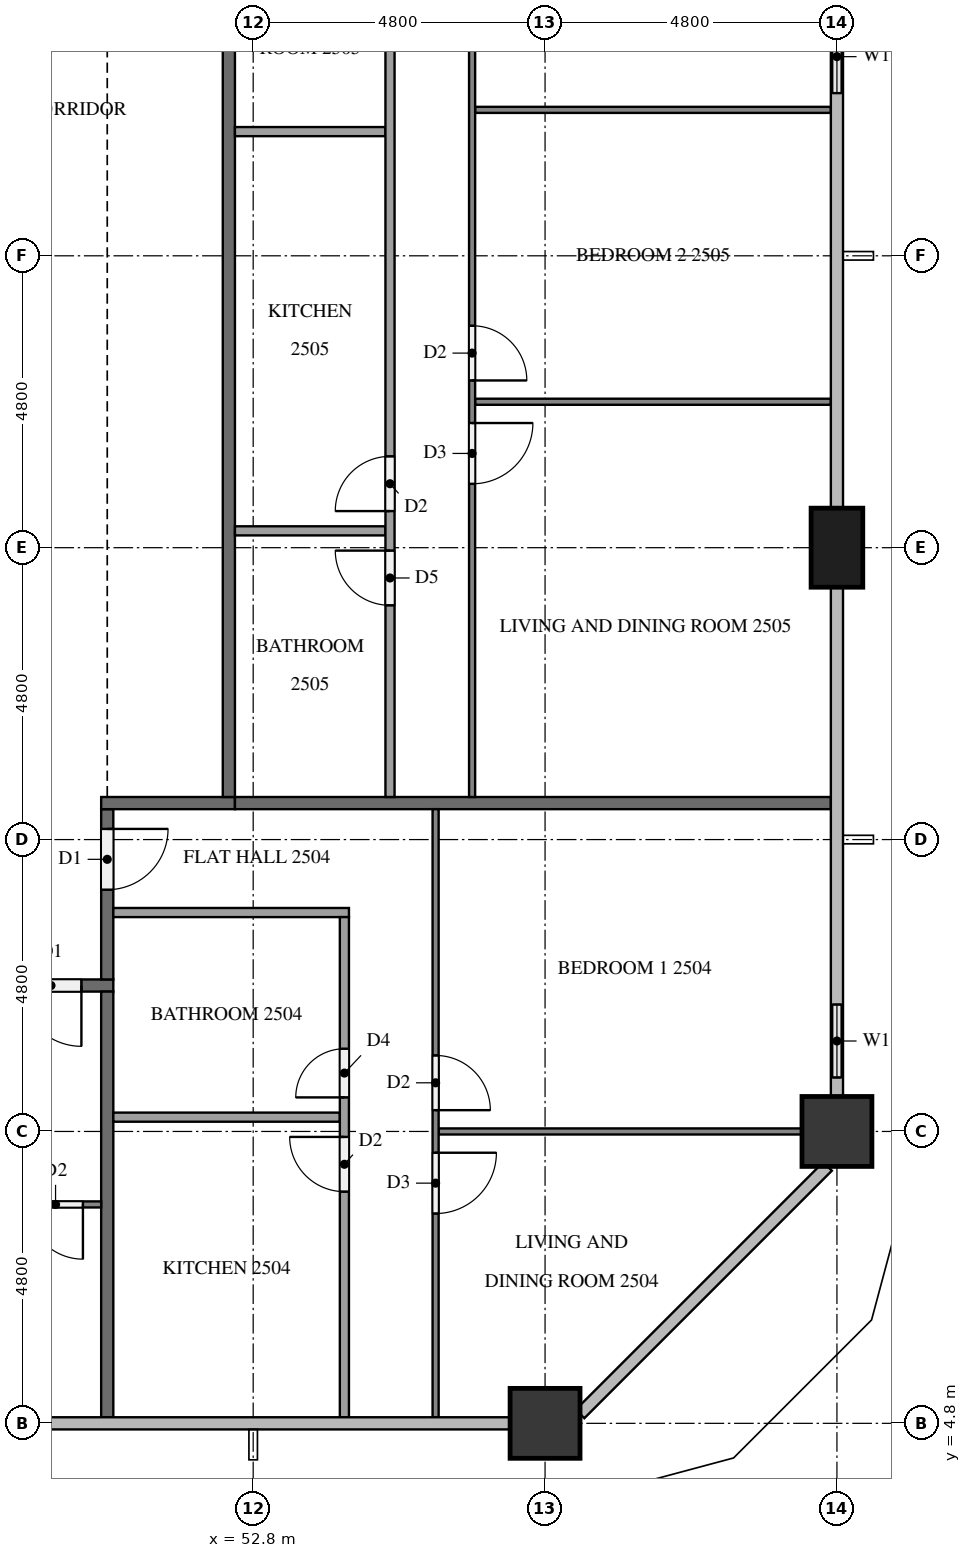
"""IFC4 building model, lengths in metres.
Left out: names, types, materials, properties, quantities, classifications, styles, units other than length and angle.
Written with IfcOpenShell. Run it as: python <this file> out.ifc"""

import sys

from ifc_helpers import new_model, si_unit, direction, frame, frame_2d, origin, origin_2d, place, context, subcontext, project, spatial, rectangle, extrude, element, fill, save


model = new_model("IFC4")
c1 = context("Model", 3, precision=1e-05, world=origin(), true_north=direction((0.0, 1.0)))
c2 = subcontext(c1, "Body", "Model", "MODEL_VIEW")
j1 = project(units=[si_unit("LENGTHUNIT", "METRE"), si_unit("PLANEANGLEUNIT", "RADIAN")], contexts=[c1])
p1 = place(None, origin())
s1 = spatial("IfcSite", under=j1, at=p1, CompositionType="ELEMENT")
p2 = place(p1, origin())
s2 = spatial("IfcBuilding", under=s1, at=p2, CompositionType="ELEMENT")
p3 = place(p2, frame((0.0, 0.0, 99.7)))
s3 = spatial("IfcBuildingStorey", under=s2, at=p3, CompositionType="ELEMENT", Elevation=99.7)
for number, where, z_axis, x_axis in (
    (1, (57.6, 4.8, 0.0), (0.0, 0.0, 1.0), (1.0, 0.0, 0.0)),
    (2, (62.4, 9.6, 0.0), (0.0, 0.0, 1.0), (1.0, 0.0, 0.0)),
):
    element("IfcColumn", number, at=place(p3, frame(where, z_axis=z_axis, x_axis=x_axis)), inside=s3, PredefinedType="COLUMN", context=c2, shape_type="SweptSolid", body=[
        extrude(rectangle(XDim=1.15, YDim=1.15, at=origin_2d()), origin(), (0.0, 0.0, 1.0), 3.2),
    ])
p4 = place(p3, frame((62.4, 19.2, 0.0), z_axis=(0.0, 0.0, 1.0), x_axis=(0.0, 1.0, 0.0)))
e3 = element("IfcColumn", 3, at=p4, inside=s3, PredefinedType="COLUMN", context=c2, shape_type="SweptSolid", body=[
    extrude(rectangle(XDim=1.3, YDim=0.85, at=origin_2d()), origin(), (0.0, 0.0, 1.0), 3.2),
])
p5 = place(p3, frame((62.4, 10.175, 0.0), z_axis=(0.0, 0.0, 1.0), x_axis=(0.0, 1.0, 0.0)))
e4 = element("IfcWall", 4, at=p5, inside=s3, PredefinedType="SOLIDWALL", context=c2, shape_type="SweptSolid", body=[
    extrude(rectangle(XDim=1.825, YDim=0.15, at=frame_2d((0.913, 0.0))), origin(), (0.0, 0.0, 1.0), 3.2),
])
p6 = place(p5, frame((0.312, 0.0, 0.9)))
e5 = element("IfcOpeningElement", 5, at=p6, cuts=e4, PredefinedType="OPENING", context=c2, shape_type="SweptSolid", body=[
    extrude(rectangle(XDim=1.2, YDim=1.4, at=frame_2d((0.6, 0.7))), frame((0.0, 0.085, 0.0), z_axis=(0.0, -1.0, 0.0), x_axis=(1.0, 0.0, 0.0)), (0.0, 0.0, 1.0), 0.17),
])
p7 = place(p3, frame((62.4, 26.4, 0.0), z_axis=(0.0, 0.0, 1.0), x_axis=(0.0, 1.0, 0.0)))
e6 = element("IfcWall", 6, at=p7, inside=s3, PredefinedType="SOLIDWALL", context=c2, shape_type="SweptSolid", body=[
    extrude(rectangle(XDim=1.75, YDim=0.15, at=frame_2d((0.875, 0.0))), origin(), (0.0, 0.0, 1.0), 3.2),
])
p8 = place(p7, frame((0.275, 0.0, 0.9)))
e7 = element("IfcOpeningElement", 7, at=p8, cuts=e6, PredefinedType="OPENING", context=c2, shape_type="SweptSolid", body=[
    extrude(rectangle(XDim=1.2, YDim=1.4, at=frame_2d((0.6, 0.7))), frame((0.0, 0.085, 0.0), z_axis=(0.0, -1.0, 0.0), x_axis=(1.0, 0.0, 0.0)), (0.0, 0.0, 1.0), 0.17),
])
p9 = place(p3, frame((50.5, 12.0, 0.0), z_axis=(0.0, 0.0, 1.0), x_axis=(-1.0, 0.0, 0.0)))
e8 = element("IfcWall", 8, at=p9, inside=s3, PredefinedType="PARTITIONING", context=c2, shape_type="SweptSolid", body=[
    extrude(rectangle(XDim=38.6, YDim=0.2, at=frame_2d((19.3, 0.0))), origin(), (0.0, 0.0, 1.0), 3.2),
])
p10 = place(p9, frame((37.075, 0.0, 0.0)))
e9 = element("IfcOpeningElement", 9, at=p10, cuts=e8, PredefinedType="OPENING", context=c2, shape_type="SweptSolid", body=[
    extrude(rectangle(XDim=1.0, YDim=2.1, at=frame_2d((0.5, 1.05))), frame((0.0, 0.11, 0.0), z_axis=(0.0, -1.0, 0.0), x_axis=(1.0, 0.0, 0.0)), (0.0, 0.0, 1.0), 0.22),
])
p11 = place(p9, frame((22.675, 0.0, 0.0)))
e10 = element("IfcOpeningElement", 10, at=p11, cuts=e8, PredefinedType="OPENING", context=c2, shape_type="SweptSolid", body=[
    extrude(rectangle(XDim=1.0, YDim=2.1, at=frame_2d((0.5, 1.05))), frame((0.0, 0.11, 0.0), z_axis=(0.0, -1.0, 0.0), x_axis=(1.0, 0.0, 0.0)), (0.0, 0.0, 1.0), 0.22),
])
p12 = place(p9, frame((0.525, 0.0, 0.0)))
e11 = element("IfcOpeningElement", 11, at=p12, cuts=e8, PredefinedType="OPENING", context=c2, shape_type="SweptSolid", body=[
    extrude(rectangle(XDim=1.0, YDim=2.1, at=frame_2d((0.5, 1.05))), frame((0.0, 0.11, 0.0), z_axis=(0.0, -1.0, 0.0), x_axis=(1.0, 0.0, 0.0)), (0.0, 0.0, 1.0), 0.22),
])
p13 = place(p3, frame((50.4, 14.9, 0.0), z_axis=(0.0, 0.0, 1.0), x_axis=(0.0, -1.0, 0.0)))
e12 = element("IfcWall", 12, at=p13, inside=s3, PredefinedType="PARTITIONING", context=c2, shape_type="SweptSolid", body=[
    extrude(rectangle(XDim=2.8, YDim=0.2, at=frame_2d((1.4, 0.0))), origin(), (0.0, 0.0, 1.0), 3.2),
])
p14 = place(p13, frame((0.325, 0.0, 0.0)))
e13 = element("IfcOpeningElement", 13, at=p14, cuts=e12, PredefinedType="OPENING", context=c2, shape_type="SweptSolid", body=[
    extrude(rectangle(XDim=1.0, YDim=2.1, at=frame_2d((0.5, 1.05))), frame((0.0, 0.11, 0.0), z_axis=(0.0, -1.0, 0.0), x_axis=(1.0, 0.0, 0.0)), (0.0, 0.0, 1.0), 0.22),
])
p15 = place(p3, frame((50.3, 15.0, 0.0), z_axis=(0.0, 0.0, 1.0), x_axis=(1.0, 0.0, 0.0)))
e14 = element("IfcWall", 14, at=p15, inside=s3, PredefinedType="PARTITIONING", context=c2, shape_type="SweptSolid", body=[
    extrude(rectangle(XDim=2.2, YDim=0.2, at=frame_2d((1.1, 0.0))), origin(), (0.0, 0.0, 1.0), 3.2),
])
p16 = place(p3, frame((52.4, 37.7, 0.0), z_axis=(0.0, 0.0, 1.0), x_axis=(0.0, -1.0, 0.0)))
e15 = element("IfcWall", 15, at=p16, inside=s3, PredefinedType="PARTITIONING", context=c2, shape_type="SweptSolid", body=[
    extrude(rectangle(XDim=22.6, YDim=0.2, at=frame_2d((11.3, 0.0))), origin(), (0.0, 0.0, 1.0), 3.2),
])
p17 = place(p16, frame((6.925, 0.0, 0.0)))
e16 = element("IfcOpeningElement", 16, at=p17, cuts=e15, PredefinedType="OPENING", context=c2, shape_type="SweptSolid", body=[
    extrude(rectangle(XDim=1.0, YDim=2.1, at=frame_2d((0.5, 1.05))), frame((0.0, 0.11, 0.0), z_axis=(0.0, -1.0, 0.0), x_axis=(1.0, 0.0, 0.0)), (0.0, 0.0, 1.0), 0.22),
])
p18 = place(p16, frame((5.075, 0.0, 0.0)))
e17 = element("IfcOpeningElement", 17, at=p18, cuts=e15, PredefinedType="OPENING", context=c2, shape_type="SweptSolid", body=[
    extrude(rectangle(XDim=1.0, YDim=2.1, at=frame_2d((0.5, 1.05))), frame((0.0, 0.11, 0.0), z_axis=(0.0, -1.0, 0.0), x_axis=(1.0, 0.0, 0.0)), (0.0, 0.0, 1.0), 0.22),
])
p19 = place(p3, frame((50.4, 11.9, 0.0), z_axis=(0.0, 0.0, 1.0), x_axis=(0.0, -1.0, 0.0)))
e18 = element("IfcWall", 18, at=p19, inside=s3, PredefinedType="PARTITIONING", context=c2, shape_type="SweptSolid", body=[
    extrude(rectangle(XDim=7.0, YDim=0.2, at=frame_2d((3.5, 0.0))), origin(), (0.0, 0.0, 1.0), 3.2),
])
p20 = place(p3, frame((52.5, 15.0, 0.0), z_axis=(0.0, 0.0, 1.0), x_axis=(1.0, 0.0, 0.0)))
e19 = element("IfcWall", 19, at=p20, inside=s3, PredefinedType="PARTITIONING", context=c2, shape_type="SweptSolid", body=[
    extrude(rectangle(XDim=9.8, YDim=0.2, at=frame_2d((4.9, 0.0))), origin(), (0.0, 0.0, 1.0), 3.2),
])
p21 = place(p3, frame((50.3, 8.4, 0.0), z_axis=(0.0, 0.0, 1.0), x_axis=(-1.0, 0.0, 0.0)))
e20 = element("IfcWall", 20, at=p21, inside=s3, PredefinedType="PARTITIONING", context=c2, shape_type="SweptSolid", body=[
    extrude(rectangle(XDim=9.4, YDim=0.1, at=frame_2d((4.7, 0.0))), origin(), (0.0, 0.0, 1.0), 3.2),
])
p22 = place(p21, frame((0.3, 0.0, 0.0)))
e21 = element("IfcOpeningElement", 21, at=p22, cuts=e20, PredefinedType="OPENING", context=c2, shape_type="SweptSolid", body=[
    extrude(rectangle(XDim=0.9, YDim=2.1, at=frame_2d((0.45, 1.05))), frame((0.0, 0.06, 0.0), z_axis=(0.0, -1.0, 0.0), x_axis=(1.0, 0.0, 0.0)), (0.0, 0.0, 1.0), 0.12),
])
p23 = place(p21, frame((8.1, 0.0, 0.0)))
e22 = element("IfcOpeningElement", 22, at=p23, cuts=e20, PredefinedType="OPENING", context=c2, shape_type="SweptSolid", body=[
    extrude(rectangle(XDim=1.0, YDim=2.1, at=frame_2d((0.5, 1.05))), frame((0.0, 0.06, 0.0), z_axis=(0.0, -1.0, 0.0), x_axis=(1.0, 0.0, 0.0)), (0.0, 0.0, 1.0), 0.12),
])
p24 = place(p3, frame((55.85, 9.6, 0.0), z_axis=(0.0, 0.0, 1.0), x_axis=(1.0, 0.0, 0.0)))
e23 = element("IfcWall", 23, at=p24, inside=s3, PredefinedType="PARTITIONING", context=c2, shape_type="SweptSolid", body=[
    extrude(rectangle(XDim=5.975, YDim=0.1, at=frame_2d((2.987, 0.0))), origin(), (0.0, 0.0, 1.0), 3.2),
])
p25 = place(p3, frame((55.8, 14.9, 0.0), z_axis=(0.0, 0.0, 1.0), x_axis=(0.0, -1.0, 0.0)))
e24 = element("IfcWall", 24, at=p25, inside=s3, PredefinedType="PARTITIONING", context=c2, shape_type="SweptSolid", body=[
    extrude(rectangle(XDim=10.0, YDim=0.1, at=frame_2d((5.0, 0.0))), origin(), (0.0, 0.0, 1.0), 3.2),
])
p26 = place(p25, frame((4.05, 0.0, 0.0)))
e25 = element("IfcOpeningElement", 25, at=p26, cuts=e24, PredefinedType="OPENING", context=c2, shape_type="SweptSolid", body=[
    extrude(rectangle(XDim=0.9, YDim=2.1, at=frame_2d((0.45, 1.05))), frame((0.0, 0.06, 0.0), z_axis=(0.0, -1.0, 0.0), x_axis=(1.0, 0.0, 0.0)), (0.0, 0.0, 1.0), 0.12),
])
p27 = place(p25, frame((5.65, 0.0, 0.0)))
e26 = element("IfcOpeningElement", 26, at=p27, cuts=e24, PredefinedType="OPENING", context=c2, shape_type="SweptSolid", body=[
    extrude(rectangle(XDim=1.0, YDim=2.1, at=frame_2d((0.5, 1.05))), frame((0.0, 0.06, 0.0), z_axis=(0.0, -1.0, 0.0), x_axis=(1.0, 0.0, 0.0)), (0.0, 0.0, 1.0), 0.12),
])
p28 = place(p3, frame((50.5, 9.835, 0.0), z_axis=(0.0, 0.0, 1.0), x_axis=(1.0, 0.0, 0.0)))
e27 = element("IfcWall", 27, at=p28, inside=s3, PredefinedType="PARTITIONING", context=c2, shape_type="SweptSolid", body=[
    extrude(rectangle(XDim=3.725, YDim=0.15, at=frame_2d((1.863, 0.0))), origin(), (0.0, 0.0, 1.0), 3.2),
])
p29 = place(p3, frame((50.5, 13.2, 0.0), z_axis=(0.0, 0.0, 1.0), x_axis=(1.0, 0.0, 0.0)))
e28 = element("IfcWall", 28, at=p29, inside=s3, PredefinedType="PARTITIONING", context=c2, shape_type="SweptSolid", body=[
    extrude(rectangle(XDim=3.875, YDim=0.15, at=frame_2d((1.938, 0.0))), origin(), (0.0, 0.0, 1.0), 3.2),
])
p30 = place(p3, frame((54.3, 4.9, 0.0), z_axis=(0.0, 0.0, 1.0), x_axis=(0.0, 1.0, 0.0)))
e29 = element("IfcWall", 29, at=p30, inside=s3, PredefinedType="PARTITIONING", context=c2, shape_type="SweptSolid", body=[
    extrude(rectangle(XDim=8.225, YDim=0.15, at=frame_2d((4.113, 0.0))), origin(), (0.0, 0.0, 1.0), 3.2),
])
p31 = place(p30, frame((5.26, 0.0, 0.0)))
e30 = element("IfcOpeningElement", 30, at=p31, cuts=e29, PredefinedType="OPENING", context=c2, shape_type="SweptSolid", body=[
    extrude(rectangle(XDim=0.8, YDim=2.1, at=frame_2d((0.4, 1.05))), frame((0.0, 0.085, 0.0), z_axis=(0.0, -1.0, 0.0), x_axis=(1.0, 0.0, 0.0)), (0.0, 0.0, 1.0), 0.17),
])
p32 = place(p30, frame((3.71, 0.0, 0.0)))
e31 = element("IfcOpeningElement", 31, at=p32, cuts=e29, PredefinedType="OPENING", context=c2, shape_type="SweptSolid", body=[
    extrude(rectangle(XDim=0.9, YDim=2.1, at=frame_2d((0.45, 1.05))), frame((0.0, 0.085, 0.0), z_axis=(0.0, -1.0, 0.0), x_axis=(1.0, 0.0, 0.0)), (0.0, 0.0, 1.0), 0.17),
])
for number, where, z_axis, x_axis in (
    (32, (56.45, 26.4, 0.0), (0.0, 0.0, 1.0), (1.0, 0.0, 0.0)),
    (33, (56.45, 21.6, 0.0), (0.0, 0.0, 1.0), (1.0, 0.0, 0.0)),
):
    element("IfcWall", number, at=place(p3, frame(where, z_axis=z_axis, x_axis=x_axis)), inside=s3, PredefinedType="PARTITIONING", context=c2, shape_type="SweptSolid", body=[
        extrude(rectangle(XDim=5.85, YDim=0.1, at=frame_2d((2.925, 0.0))), origin(), (0.0, 0.0, 1.0), 3.2),
    ])
p33 = place(p3, frame((56.4, 31.1, 0.0), z_axis=(0.0, 0.0, 1.0), x_axis=(0.0, -1.0, 0.0)))
e34 = element("IfcWall", 34, at=p33, inside=s3, PredefinedType="PARTITIONING", context=c2, shape_type="SweptSolid", body=[
    extrude(rectangle(XDim=16.0, YDim=0.1, at=frame_2d((8.0, 0.0))), origin(), (0.0, 0.0, 1.0), 3.2),
])
p34 = place(p33, frame((0.3, 0.0, 0.0)))
e35 = element("IfcOpeningElement", 35, at=p34, cuts=e34, PredefinedType="OPENING", context=c2, shape_type="SweptSolid", body=[
    extrude(rectangle(XDim=0.9, YDim=2.1, at=frame_2d((0.45, 1.05))), frame((0.0, 0.06, 0.0), z_axis=(0.0, -1.0, 0.0), x_axis=(1.0, 0.0, 0.0)), (0.0, 0.0, 1.0), 0.12),
])
p35 = place(p33, frame((8.25, 0.0, 0.0)))
e36 = element("IfcOpeningElement", 36, at=p35, cuts=e34, PredefinedType="OPENING", context=c2, shape_type="SweptSolid", body=[
    extrude(rectangle(XDim=0.9, YDim=2.1, at=frame_2d((0.45, 1.05))), frame((0.0, 0.06, 0.0), z_axis=(0.0, -1.0, 0.0), x_axis=(1.0, 0.0, 0.0)), (0.0, 0.0, 1.0), 0.12),
])
p36 = place(p33, frame((9.85, 0.0, 0.0)))
e37 = element("IfcOpeningElement", 37, at=p36, cuts=e34, PredefinedType="OPENING", context=c2, shape_type="SweptSolid", body=[
    extrude(rectangle(XDim=1.0, YDim=2.1, at=frame_2d((0.5, 1.05))), frame((0.0, 0.06, 0.0), z_axis=(0.0, -1.0, 0.0), x_axis=(1.0, 0.0, 0.0)), (0.0, 0.0, 1.0), 0.12),
])
for number, where, z_axis, x_axis in (
    (38, (52.5, 26.042, 0.0), (0.0, 0.0, 1.0), (1.0, 0.0, 0.0)),
    (39, (52.5, 19.477, 0.0), (0.0, 0.0, 1.0), (1.0, 0.0, 0.0)),
):
    element("IfcWall", number, at=place(p3, frame(where, z_axis=z_axis, x_axis=x_axis)), inside=s3, PredefinedType="PARTITIONING", context=c2, shape_type="SweptSolid", body=[
        extrude(rectangle(XDim=2.475, YDim=0.15, at=frame_2d((1.238, 0.0))), origin(), (0.0, 0.0, 1.0), 3.2),
    ])
p37 = place(p3, frame((55.05, 15.1, 0.0), z_axis=(0.0, 0.0, 1.0), x_axis=(0.0, 1.0, 0.0)))
e40 = element("IfcWall", 40, at=p37, inside=s3, PredefinedType="PARTITIONING", context=c2, shape_type="SweptSolid", body=[
    extrude(rectangle(XDim=14.225, YDim=0.15, at=frame_2d((7.112, 0.0))), origin(), (0.0, 0.0, 1.0), 3.2),
])
p38 = place(p37, frame((13.125, 0.0, 0.0)))
e41 = element("IfcOpeningElement", 41, at=p38, cuts=e40, PredefinedType="OPENING", context=c2, shape_type="SweptSolid", body=[
    extrude(rectangle(XDim=0.8, YDim=2.1, at=frame_2d((0.4, 1.05))), frame((0.0, 0.085, 0.0), z_axis=(0.0, -1.0, 0.0), x_axis=(1.0, 0.0, 0.0)), (0.0, 0.0, 1.0), 0.17),
])
p39 = place(p37, frame((4.702, 0.0, 0.0)))
e42 = element("IfcOpeningElement", 42, at=p39, cuts=e40, PredefinedType="OPENING", context=c2, shape_type="SweptSolid", body=[
    extrude(rectangle(XDim=0.9, YDim=2.1, at=frame_2d((0.45, 1.05))), frame((0.0, 0.085, 0.0), z_axis=(0.0, -1.0, 0.0), x_axis=(1.0, 0.0, 0.0)), (0.0, 0.0, 1.0), 0.17),
])
p40 = place(p37, frame((3.152, 0.0, 0.0)))
e43 = element("IfcOpeningElement", 43, at=p40, cuts=e40, PredefinedType="OPENING", context=c2, shape_type="SweptSolid", body=[
    extrude(rectangle(XDim=0.9, YDim=2.1, at=frame_2d((0.45, 1.05))), frame((0.0, 0.085, 0.0), z_axis=(0.0, -1.0, 0.0), x_axis=(1.0, 0.0, 0.0)), (0.0, 0.0, 1.0), 0.17),
])
p41 = place(p6, origin())
e44 = element("IfcWindow", 44, at=p41, inside=s3, PartitioningType="SINGLE_PANEL", PredefinedType="WINDOW", context=c2, shape_type="SweptSolid", body=[
    extrude(rectangle(XDim=1.2, YDim=1.4, at=frame_2d((0.6, 0.7))), frame((0.0, 0.03, 0.0), z_axis=(0.0, -1.0, 0.0), x_axis=(1.0, 0.0, 0.0)), (0.0, 0.0, 1.0), 0.06),
])
fill(e5, e44)
p42 = place(p8, origin())
e45 = element("IfcWindow", 45, at=p42, inside=s3, PartitioningType="SINGLE_PANEL", PredefinedType="WINDOW", context=c2, shape_type="SweptSolid", body=[
    extrude(rectangle(XDim=1.2, YDim=1.4, at=frame_2d((0.6, 0.7))), frame((0.0, 0.03, 0.0), z_axis=(0.0, -1.0, 0.0), x_axis=(1.0, 0.0, 0.0)), (0.0, 0.0, 1.0), 0.06),
])
fill(e7, e45)
p43 = place(p12, origin())
e46 = element("IfcDoor", 46, at=p43, inside=s3, OperationType="SINGLE_SWING_LEFT", PredefinedType="DOOR", context=c2, shape_type="SweptSolid", body=[
    extrude(rectangle(XDim=1.0, YDim=2.1, at=frame_2d((0.5, 1.05))), frame((0.0, 0.025, 0.0), z_axis=(0.0, -1.0, 0.0), x_axis=(1.0, 0.0, 0.0)), (0.0, 0.0, 1.0), 0.05),
])
fill(e11, e46)
p44 = place(p14, origin())
e47 = element("IfcDoor", 47, at=p44, inside=s3, OperationType="SINGLE_SWING_LEFT", PredefinedType="DOOR", context=c2, shape_type="SweptSolid", body=[
    extrude(rectangle(XDim=1.0, YDim=2.1, at=frame_2d((0.5, 1.05))), frame((0.0, 0.025, 0.0), z_axis=(0.0, -1.0, 0.0), x_axis=(1.0, 0.0, 0.0)), (0.0, 0.0, 1.0), 0.05),
])
fill(e13, e47)
p45 = place(p22, origin())
e48 = element("IfcDoor", 48, at=p45, inside=s3, OperationType="SINGLE_SWING_LEFT", PredefinedType="DOOR", context=c2, shape_type="SweptSolid", body=[
    extrude(rectangle(XDim=0.9, YDim=2.1, at=frame_2d((0.45, 1.05))), frame((0.0, 0.025, 0.0), z_axis=(0.0, -1.0, 0.0), x_axis=(1.0, 0.0, 0.0)), (0.0, 0.0, 1.0), 0.05),
])
fill(e21, e48)
p46 = place(p26, origin())
e49 = element("IfcDoor", 49, at=p46, inside=s3, OperationType="SINGLE_SWING_RIGHT", PredefinedType="DOOR", context=c2, shape_type="SweptSolid", body=[
    extrude(rectangle(XDim=0.9, YDim=2.1, at=frame_2d((0.45, 1.05))), frame((0.0, 0.025, 0.0), z_axis=(0.0, -1.0, 0.0), x_axis=(1.0, 0.0, 0.0)), (0.0, 0.0, 1.0), 0.05),
])
fill(e25, e49)
p47 = place(p27, origin())
e50 = element("IfcDoor", 50, at=p47, inside=s3, OperationType="SINGLE_SWING_LEFT", PredefinedType="DOOR", context=c2, shape_type="SweptSolid", body=[
    extrude(rectangle(XDim=1.0, YDim=2.1, at=frame_2d((0.5, 1.05))), frame((0.0, 0.025, 0.0), z_axis=(0.0, -1.0, 0.0), x_axis=(1.0, 0.0, 0.0)), (0.0, 0.0, 1.0), 0.05),
])
fill(e26, e50)
p48 = place(p31, origin())
e51 = element("IfcDoor", 51, at=p48, inside=s3, OperationType="SINGLE_SWING_LEFT", PredefinedType="DOOR", context=c2, shape_type="SweptSolid", body=[
    extrude(rectangle(XDim=0.8, YDim=2.1, at=frame_2d((0.4, 1.05))), frame((0.0, 0.025, 0.0), z_axis=(0.0, -1.0, 0.0), x_axis=(1.0, 0.0, 0.0)), (0.0, 0.0, 1.0), 0.05),
])
fill(e30, e51)
p49 = place(p32, origin())
e52 = element("IfcDoor", 52, at=p49, inside=s3, OperationType="SINGLE_SWING_RIGHT", PredefinedType="DOOR", context=c2, shape_type="SweptSolid", body=[
    extrude(rectangle(XDim=0.9, YDim=2.1, at=frame_2d((0.45, 1.05))), frame((0.0, 0.025, 0.0), z_axis=(0.0, -1.0, 0.0), x_axis=(1.0, 0.0, 0.0)), (0.0, 0.0, 1.0), 0.05),
])
fill(e31, e52)
p50 = place(p35, origin())
e53 = element("IfcDoor", 53, at=p50, inside=s3, OperationType="SINGLE_SWING_RIGHT", PredefinedType="DOOR", context=c2, shape_type="SweptSolid", body=[
    extrude(rectangle(XDim=0.9, YDim=2.1, at=frame_2d((0.45, 1.05))), frame((0.0, 0.025, 0.0), z_axis=(0.0, -1.0, 0.0), x_axis=(1.0, 0.0, 0.0)), (0.0, 0.0, 1.0), 0.05),
])
fill(e36, e53)
p51 = place(p36, origin())
e54 = element("IfcDoor", 54, at=p51, inside=s3, OperationType="SINGLE_SWING_LEFT", PredefinedType="DOOR", context=c2, shape_type="SweptSolid", body=[
    extrude(rectangle(XDim=1.0, YDim=2.1, at=frame_2d((0.5, 1.05))), frame((0.0, 0.025, 0.0), z_axis=(0.0, -1.0, 0.0), x_axis=(1.0, 0.0, 0.0)), (0.0, 0.0, 1.0), 0.05),
])
fill(e37, e54)
p52 = place(p39, origin())
e55 = element("IfcDoor", 55, at=p52, inside=s3, OperationType="SINGLE_SWING_LEFT", PredefinedType="DOOR", context=c2, shape_type="SweptSolid", body=[
    extrude(rectangle(XDim=0.9, YDim=2.1, at=frame_2d((0.45, 1.05))), frame((0.0, 0.025, 0.0), z_axis=(0.0, -1.0, 0.0), x_axis=(1.0, 0.0, 0.0)), (0.0, 0.0, 1.0), 0.05),
])
fill(e42, e55)
p53 = place(p40, origin())
e56 = element("IfcDoor", 56, at=p53, inside=s3, OperationType="SINGLE_SWING_RIGHT", PredefinedType="DOOR", context=c2, shape_type="SweptSolid", body=[
    extrude(rectangle(XDim=0.9, YDim=2.1, at=frame_2d((0.45, 1.05))), frame((0.0, 0.025, 0.0), z_axis=(0.0, -1.0, 0.0), x_axis=(1.0, 0.0, 0.0)), (0.0, 0.0, 1.0), 0.05),
])
fill(e43, e56)
save(model, sys.argv[1])
